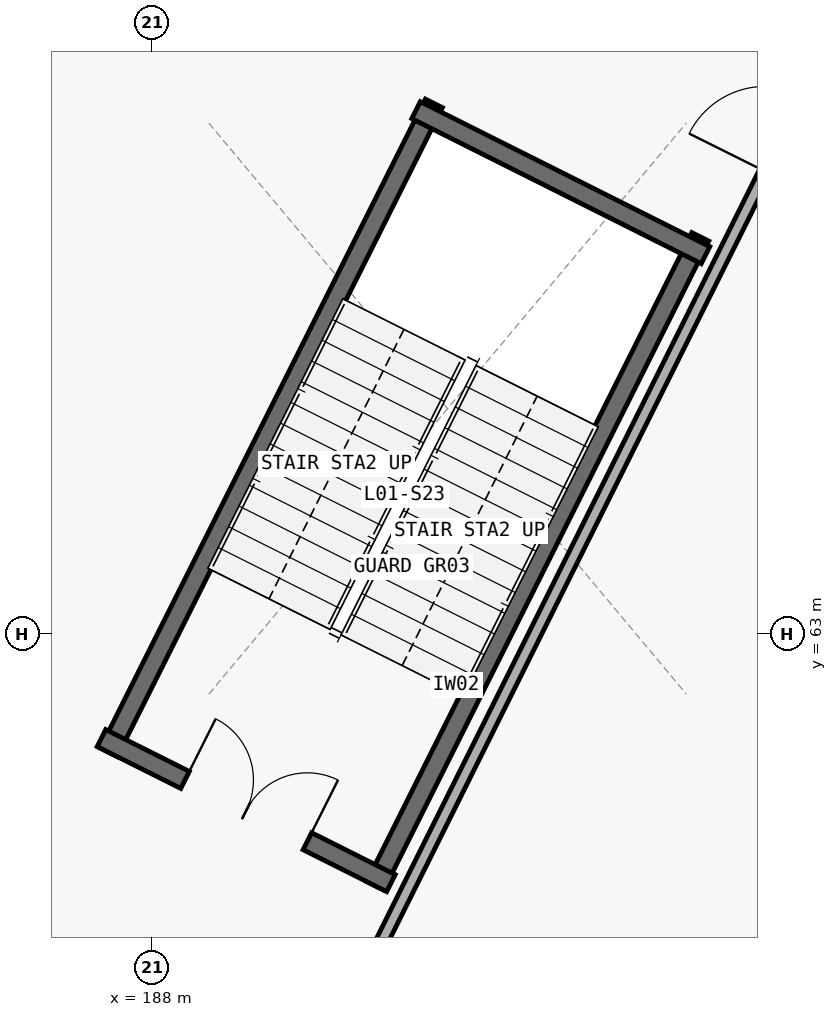
"""IFC4 building model, lengths in metres.
Left out: names, types, materials, properties, quantities, classifications, styles, units other than length and angle.
Written with IfcOpenShell. Run it as: python <this file> out.ifc"""

import sys

from ifc_helpers import new_model, si_unit, direction, frame, frame_2d, origin, place, context, subcontext, project, spatial, rectangle, extrude, element, fill, save


model = new_model("IFC4")
c1 = context("Model", 3, precision=1e-05, world=origin(), true_north=direction((0.0, 1.0)))
c2 = subcontext(c1, "Body", "Model", "MODEL_VIEW")
j1 = project(units=[si_unit("LENGTHUNIT", "METRE"), si_unit("PLANEANGLEUNIT", "RADIAN")], contexts=[c1])
p1 = place(None, origin())
s1 = spatial("IfcSite", under=j1, at=p1, CompositionType="ELEMENT")
p2 = place(p1, origin())
s2 = spatial("IfcBuilding", under=s1, at=p2, CompositionType="ELEMENT")
p3 = place(p2, frame((0.0, 0.0, 5.4)))
s3 = spatial("IfcBuildingStorey", under=s2, at=p3, CompositionType="ELEMENT", Elevation=5.4)
p4 = place(p3, frame((190.937, 59.687, 0.0), z_axis=(0.0, 0.0, 1.0), x_axis=(0.447919041961, 0.894074119885, 0.0)))
e1 = element("IfcWall", 1, at=p4, inside=s3, PredefinedType="SHEAR", context=c2, shape_type="SweptSolid", body=[
    extrude(rectangle(XDim=9.55, YDim=0.25, at=frame_2d((4.775, 0.0))), origin(), (0.0, 0.0, 1.0), 4.52),
])
p5 = place(p3, frame((191.709, 69.981, 0.0), z_axis=(0.0, 0.0, 1.0), x_axis=(-0.4479088042, -0.894079248792, 0.0)))
e2 = element("IfcWall", 2, at=p5, inside=s3, PredefinedType="SHEAR", context=c2, shape_type="SweptSolid", body=[
    extrude(rectangle(XDim=9.55, YDim=0.25, at=frame_2d((4.775, 0.0))), origin(), (0.0, 0.0, 1.0), 4.52),
])
p6 = place(p3, frame((187.336, 61.63, 0.0), z_axis=(0.0, 0.0, 1.0), x_axis=(0.894071595331, -0.447924081092, 0.0)))
e3 = element("IfcWall", 3, at=p6, inside=s3, PredefinedType="SHEAR", context=c2, shape_type="SweptSolid", body=[
    extrude(rectangle(XDim=4.26, YDim=0.25, at=frame_2d((2.13, 0.0))), origin(), (0.0, 0.0, 1.0), 4.52),
])
p7 = place(p6, frame((1.23, 0.0, 0.0)))
e4 = element("IfcOpeningElement", 4, at=p7, cuts=e3, PredefinedType="OPENING", context=c2, shape_type="SweptSolid", body=[
    extrude(rectangle(XDim=1.8, YDim=2.25, at=frame_2d((0.9, 1.125))), frame((0.0, 0.135, 0.0), z_axis=(0.0, -1.0, 0.0), x_axis=(1.0, 0.0, 0.0)), (0.0, 0.0, 1.0), 0.27),
])
p8 = place(p3, frame((195.283, 67.984, 0.0), z_axis=(0.0, 0.0, 1.0), x_axis=(-0.894083048484, 0.447901219481, 0.0)))
e5 = element("IfcWall", 5, at=p8, inside=s3, PredefinedType="SHEAR", context=c2, shape_type="SweptSolid", body=[
    extrude(rectangle(XDim=4.26, YDim=0.25, at=frame_2d((2.13, 0.0))), origin(), (0.0, 0.0, 1.0), 4.52),
])
p9 = place(p3, frame((189.059, 55.01, 0.0), z_axis=(0.0, 0.0, 1.0), x_axis=(0.44590512567, 0.895080230427, 0.0)))
e6 = element("IfcWall", 6, at=p9, inside=s3, PredefinedType="PARTITIONING", context=c2, shape_type="SweptSolid", body=[
    extrude(rectangle(XDim=19.935, YDim=0.16, at=frame_2d((9.967, 0.0))), origin(), (0.0, 0.0, 1.0), 3.665),
])
p10 = place(p9, frame((15.724, 0.0, 0.0)))
e7 = element("IfcOpeningElement", 7, at=p10, cuts=e6, PredefinedType="OPENING", context=c2, shape_type="SweptSolid", body=[
    extrude(rectangle(XDim=1.12, YDim=2.25, at=frame_2d((0.56, 1.125))), frame((0.0, 0.09, 0.0), z_axis=(0.0, -1.0, 0.0), x_axis=(1.0, 0.0, 0.0)), (0.0, 0.0, 1.0), 0.18),
])
p11 = place(p7, origin())
e8 = element("IfcDoor", 8, at=p11, inside=s3, OperationType="DOUBLE_DOOR_SINGLE_SWING", PredefinedType="DOOR", context=c2, shape_type="SweptSolid", body=[
    extrude(rectangle(XDim=1.8, YDim=2.25, at=frame_2d((0.9, 1.125))), frame((0.0, 0.025, 0.0), z_axis=(0.0, -1.0, 0.0), x_axis=(1.0, 0.0, 0.0)), (0.0, 0.0, 1.0), 0.05),
])
fill(e4, e8)
save(model, sys.argv[1])
